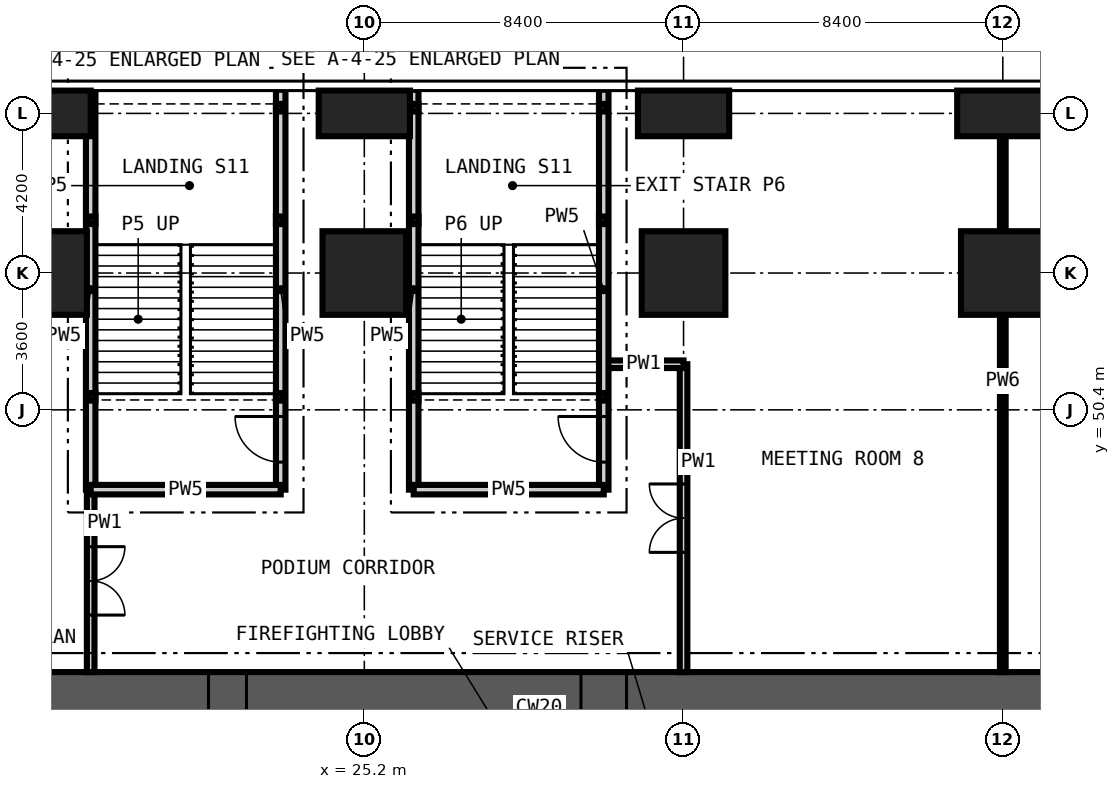
"""IFC4 building model, lengths in metres.
Left out: names, types, materials, properties, quantities, classifications, styles, units other than length and angle.
Written with IfcOpenShell. Run it as: python <this file> out.ifc"""

import sys

from ifc_helpers import new_model, si_unit, direction, frame, frame_2d, origin, origin_2d, place, context, subcontext, project, spatial, rectangle, hollow_rectangle, extrude, element, fill, save


model = new_model("IFC4")
c1 = context("Model", 3, precision=1e-05, world=origin(), true_north=direction((0.0, 1.0)))
c2 = subcontext(c1, "Body", "Model", "MODEL_VIEW")
j1 = project(units=[si_unit("LENGTHUNIT", "METRE"), si_unit("PLANEANGLEUNIT", "RADIAN")], contexts=[c1])
p1 = place(None, origin())
s1 = spatial("IfcSite", under=j1, at=p1, CompositionType="ELEMENT")
p2 = place(p1, origin())
s2 = spatial("IfcBuilding", under=s1, at=p2, CompositionType="ELEMENT")
p3 = place(p2, frame((0.0, 0.0, 12.0)))
s3 = spatial("IfcBuildingStorey", under=s2, at=p3, CompositionType="ELEMENT", Elevation=12.0)
p4 = place(p3, frame((16.8, 54.0, -0.3), z_axis=(0.0, 0.0, 1.0), x_axis=(1.0, 0.0, 0.0)))
e1 = element("IfcColumn", 1, at=p4, inside=s3, PredefinedType="COLUMN", context=c2, shape_type="SweptSolid", body=[
    extrude(rectangle(XDim=2.2, YDim=2.2, at=origin_2d()), origin(), (0.0, 0.0, 1.0), 5.0),
])
p5 = place(p3, frame((16.8, 58.2, -0.3), z_axis=(0.0, 0.0, 1.0), x_axis=(1.0, 0.0, 0.0)))
e2 = element("IfcColumn", 2, at=p5, inside=s3, PredefinedType="COLUMN", context=c2, shape_type="SweptSolid", body=[
    extrude(rectangle(XDim=2.4, YDim=1.2, at=origin_2d()), origin(), (0.0, 0.0, 1.0), 5.0),
])
p6 = place(p3, frame((25.2, 54.0, -0.3), z_axis=(0.0, 0.0, 1.0), x_axis=(1.0, 0.0, 0.0)))
e3 = element("IfcColumn", 3, at=p6, inside=s3, PredefinedType="COLUMN", context=c2, shape_type="SweptSolid", body=[
    extrude(rectangle(XDim=2.2, YDim=2.2, at=origin_2d()), origin(), (0.0, 0.0, 1.0), 5.0),
])
p7 = place(p3, frame((25.2, 58.2, -0.3), z_axis=(0.0, 0.0, 1.0), x_axis=(1.0, 0.0, 0.0)))
e4 = element("IfcColumn", 4, at=p7, inside=s3, PredefinedType="COLUMN", context=c2, shape_type="SweptSolid", body=[
    extrude(rectangle(XDim=2.4, YDim=1.2, at=origin_2d()), origin(), (0.0, 0.0, 1.0), 5.0),
])
p8 = place(p3, frame((33.6, 54.0, -0.3), z_axis=(0.0, 0.0, 1.0), x_axis=(1.0, 0.0, 0.0)))
e5 = element("IfcColumn", 5, at=p8, inside=s3, PredefinedType="COLUMN", context=c2, shape_type="SweptSolid", body=[
    extrude(rectangle(XDim=2.2, YDim=2.2, at=origin_2d()), origin(), (0.0, 0.0, 1.0), 5.0),
])
p9 = place(p3, frame((33.6, 58.2, -0.3), z_axis=(0.0, 0.0, 1.0), x_axis=(1.0, 0.0, 0.0)))
e6 = element("IfcColumn", 6, at=p9, inside=s3, PredefinedType="COLUMN", context=c2, shape_type="SweptSolid", body=[
    extrude(rectangle(XDim=2.4, YDim=1.2, at=origin_2d()), origin(), (0.0, 0.0, 1.0), 5.0),
])
p10 = place(p3, frame((42.0, 54.0, -0.3), z_axis=(0.0, 0.0, 1.0), x_axis=(1.0, 0.0, 0.0)))
e7 = element("IfcColumn", 7, at=p10, inside=s3, PredefinedType="COLUMN", context=c2, shape_type="SweptSolid", body=[
    extrude(rectangle(XDim=2.2, YDim=2.2, at=origin_2d()), origin(), (0.0, 0.0, 1.0), 5.0),
])
p11 = place(p3, frame((42.0, 58.2, -0.3), z_axis=(0.0, 0.0, 1.0), x_axis=(1.0, 0.0, 0.0)))
e8 = element("IfcColumn", 8, at=p11, inside=s3, PredefinedType="COLUMN", context=c2, shape_type="SweptSolid", body=[
    extrude(rectangle(XDim=2.4, YDim=1.2, at=origin_2d()), origin(), (0.0, 0.0, 1.0), 5.0),
])
p12 = place(p3, frame((43.5, 42.5, -0.3), z_axis=(0.0, 0.0, 1.0), x_axis=(-1.0, 0.0, 0.0)))
e9 = element("IfcWall", 9, at=p12, inside=s3, PredefinedType="SHEAR", context=c2, shape_type="SweptSolid", body=[
    extrude(rectangle(XDim=28.2, YDim=2.0, at=frame_2d((14.1, 0.0))), origin(), (0.0, 0.0, 1.0), 5.0),
])
p13 = place(p12, frame((21.4, 0.0, 0.3)))
e10 = element("IfcOpeningElement", 10, at=p13, cuts=e9, PredefinedType="OPENING", context=c2, shape_type="SweptSolid", body=[
    extrude(rectangle(XDim=1.0, YDim=2.1, at=frame_2d((0.5, 1.05))), frame((0.0, 1.01, 0.0), z_axis=(0.0, -1.0, 0.0), x_axis=(1.0, 0.0, 0.0)), (0.0, 0.0, 1.0), 2.02),
])
p14 = place(p12, frame((11.4, 0.0, 0.3)))
e11 = element("IfcOpeningElement", 11, at=p14, cuts=e9, PredefinedType="OPENING", context=c2, shape_type="SweptSolid", body=[
    extrude(rectangle(XDim=1.2, YDim=2.2, at=frame_2d((0.6, 1.1))), frame((0.0, 1.01, 0.0), z_axis=(0.0, -1.0, 0.0), x_axis=(1.0, 0.0, 0.0)), (0.0, 0.0, 1.0), 2.02),
])
p15 = place(p3, frame((33.6, 43.5, 0.0), z_axis=(0.0, 0.0, 1.0), x_axis=(0.0, 1.0, 0.0)))
e12 = element("IfcWall", 12, at=p15, inside=s3, PredefinedType="PARTITIONING", context=c2, shape_type="SweptSolid", body=[
    extrude(rectangle(XDim=8.1, YDim=0.2, at=frame_2d((4.05, 0.0))), origin(), (0.0, 0.0, 1.0), 4.7),
])
p16 = place(p15, frame((3.15, 0.0, 0.0)))
e13 = element("IfcOpeningElement", 13, at=p16, cuts=e12, PredefinedType="OPENING", context=c2, shape_type="SweptSolid", body=[
    extrude(rectangle(XDim=1.8, YDim=2.4, at=frame_2d((0.9, 1.2))), frame((0.0, 0.11, 0.0), z_axis=(0.0, -1.0, 0.0), x_axis=(1.0, 0.0, 0.0)), (0.0, 0.0, 1.0), 0.22),
])
p17 = place(p3, frame((18.0, 48.3, 0.0), z_axis=(0.0, 0.0, 1.0), x_axis=(0.0, -1.0, 0.0)))
e14 = element("IfcWall", 14, at=p17, inside=s3, PredefinedType="PARTITIONING", context=c2, shape_type="SweptSolid", body=[
    extrude(rectangle(XDim=4.8, YDim=0.2, at=frame_2d((2.4, 0.0))), origin(), (0.0, 0.0, 1.0), 4.7),
])
p18 = place(p17, frame((1.5, 0.0, 0.0)))
e15 = element("IfcOpeningElement", 15, at=p18, cuts=e14, PredefinedType="OPENING", context=c2, shape_type="SweptSolid", body=[
    extrude(rectangle(XDim=1.8, YDim=2.4, at=frame_2d((0.9, 1.2))), frame((0.0, 0.11, 0.0), z_axis=(0.0, -1.0, 0.0), x_axis=(1.0, 0.0, 0.0)), (0.0, 0.0, 1.0), 0.22),
])
p19 = place(p3, frame((33.6, 51.6, 0.0), z_axis=(0.0, 0.0, 1.0), x_axis=(-1.0, 0.0, 0.0)))
e16 = element("IfcWall", 16, at=p19, inside=s3, PredefinedType="PARTITIONING", context=c2, shape_type="SweptSolid", body=[
    extrude(rectangle(XDim=2.1, YDim=0.2, at=frame_2d((1.05, 0.0))), origin(), (0.0, 0.0, 1.0), 4.7),
])
p20 = place(p3, frame((42.0, 43.5, 0.0), z_axis=(0.0, 0.0, 1.0), x_axis=(0.0, 1.0, 0.0)))
e17 = element("IfcWall", 17, at=p20, inside=s3, PredefinedType="PARTITIONING", context=c2, shape_type="SweptSolid", body=[
    extrude(rectangle(XDim=15.3, YDim=0.15, at=frame_2d((7.65, 0.0))), origin(), (0.0, 0.0, 1.0), 4.7),
])
p21 = place(p3, frame((18.0, 48.3, 0.0), z_axis=(0.0, 0.0, 1.0), x_axis=(0.0, 1.0, 0.0)))
e18 = element("IfcWall", 18, at=p21, inside=s3, PredefinedType="PARTITIONING", context=c2, shape_type="SweptSolid", body=[
    extrude(rectangle(XDim=10.523, YDim=0.25, at=frame_2d((5.261, 0.0))), origin(), (0.0, 0.0, 1.0), 4.7),
])
p22 = place(p3, frame((23.0, 48.3, 0.0), z_axis=(0.0, 0.0, 1.0), x_axis=(0.0, 1.0, 0.0)))
e19 = element("IfcWall", 19, at=p22, inside=s3, PredefinedType="PARTITIONING", context=c2, shape_type="SweptSolid", body=[
    extrude(rectangle(XDim=10.523, YDim=0.25, at=frame_2d((5.261, 0.0))), origin(), (0.0, 0.0, 1.0), 4.7),
])
p23 = place(p22, frame((0.725, 0.0, 0.0)))
e20 = element("IfcOpeningElement", 20, at=p23, cuts=e19, PredefinedType="OPENING", context=c2, shape_type="SweptSolid", body=[
    extrude(rectangle(XDim=1.2, YDim=2.2, at=frame_2d((0.6, 1.1))), frame((0.0, 0.135, 0.0), z_axis=(0.0, -1.0, 0.0), x_axis=(1.0, 0.0, 0.0)), (0.0, 0.0, 1.0), 0.27),
])
p24 = place(p3, frame((26.5, 48.3, 0.0), z_axis=(0.0, 0.0, 1.0), x_axis=(0.0, 1.0, 0.0)))
e21 = element("IfcWall", 21, at=p24, inside=s3, PredefinedType="PARTITIONING", context=c2, shape_type="SweptSolid", body=[
    extrude(rectangle(XDim=10.523, YDim=0.25, at=frame_2d((5.261, 0.0))), origin(), (0.0, 0.0, 1.0), 4.7),
])
p25 = place(p3, frame((31.5, 48.3, 0.0), z_axis=(0.0, 0.0, 1.0), x_axis=(0.0, 1.0, 0.0)))
e22 = element("IfcWall", 22, at=p25, inside=s3, PredefinedType="PARTITIONING", context=c2, shape_type="SweptSolid", body=[
    extrude(rectangle(XDim=10.523, YDim=0.25, at=frame_2d((5.261, 0.0))), origin(), (0.0, 0.0, 1.0), 4.7),
])
p26 = place(p25, frame((0.725, 0.0, 0.0)))
e23 = element("IfcOpeningElement", 23, at=p26, cuts=e22, PredefinedType="OPENING", context=c2, shape_type="SweptSolid", body=[
    extrude(rectangle(XDim=1.2, YDim=2.2, at=frame_2d((0.6, 1.1))), frame((0.0, 0.135, 0.0), z_axis=(0.0, -1.0, 0.0), x_axis=(1.0, 0.0, 0.0)), (0.0, 0.0, 1.0), 0.27),
])
for number, where, z_axis, x_axis in (
    (24, (18.0, 48.3, 0.0), (0.0, 0.0, 1.0), (1.0, 0.0, 0.0)),
    (25, (26.5, 48.3, 0.0), (0.0, 0.0, 1.0), (1.0, 0.0, 0.0)),
):
    element("IfcWall", number, at=place(p3, frame(where, z_axis=z_axis, x_axis=x_axis)), inside=s3, PredefinedType="PARTITIONING", context=c2, shape_type="SweptSolid", body=[
        extrude(rectangle(XDim=5.0, YDim=0.25, at=frame_2d((2.5, 0.0))), origin(), (0.0, 0.0, 1.0), 4.7),
    ])
for number, where, z_axis, x_axis in (
    (26, (18.025, 50.742, -0.3), (0.0, 0.0, 1.0), (1.0, 0.0, 0.0)),
    (27, (22.975, 50.742, -0.3), (0.0, 0.0, 1.0), (1.0, 0.0, 0.0)),
    (28, (18.025, 55.387, -0.3), (0.0, 0.0, 1.0), (1.0, 0.0, 0.0)),
    (29, (22.975, 55.387, -0.3), (0.0, 0.0, 1.0), (1.0, 0.0, 0.0)),
    (30, (22.975, 58.35, -0.3), (0.0, 0.0, 1.0), (1.0, 0.0, 0.0)),
    (31, (26.525, 50.742, -0.3), (0.0, 0.0, 1.0), (1.0, 0.0, 0.0)),
    (32, (31.475, 50.742, -0.3), (0.0, 0.0, 1.0), (1.0, 0.0, 0.0)),
    (33, (26.525, 55.387, -0.3), (0.0, 0.0, 1.0), (1.0, 0.0, 0.0)),
    (34, (31.475, 55.387, -0.3), (0.0, 0.0, 1.0), (1.0, 0.0, 0.0)),
    (35, (26.525, 58.35, -0.3), (0.0, 0.0, 1.0), (1.0, 0.0, 0.0)),
    (36, (31.475, 58.35, -0.3), (0.0, 0.0, 1.0), (1.0, 0.0, 0.0)),
):
    element("IfcColumn", number, at=place(p3, frame(where, z_axis=z_axis, x_axis=x_axis)), inside=s3, PredefinedType="COLUMN", context=c2, shape_type="SweptSolid", body=[
        extrude(hollow_rectangle(XDim=0.2, YDim=0.2, WallThickness=0.01, at=origin_2d()), origin(), (0.0, 0.0, 1.0), 5.0),
    ])
p27 = place(p23, origin())
e37 = element("IfcDoor", 37, at=p27, inside=s3, OperationType="SINGLE_SWING_RIGHT", PredefinedType="DOOR", context=c2, shape_type="SweptSolid", body=[
    extrude(rectangle(XDim=1.2, YDim=2.2, at=frame_2d((0.6, 1.1))), frame((0.0, 0.025, 0.0), z_axis=(0.0, -1.0, 0.0), x_axis=(1.0, 0.0, 0.0)), (0.0, 0.0, 1.0), 0.05),
])
fill(e20, e37)
p28 = place(p26, origin())
e38 = element("IfcDoor", 38, at=p28, inside=s3, OperationType="SINGLE_SWING_RIGHT", PredefinedType="DOOR", context=c2, shape_type="SweptSolid", body=[
    extrude(rectangle(XDim=1.2, YDim=2.2, at=frame_2d((0.6, 1.1))), frame((0.0, 0.025, 0.0), z_axis=(0.0, -1.0, 0.0), x_axis=(1.0, 0.0, 0.0)), (0.0, 0.0, 1.0), 0.05),
])
fill(e23, e38)
p29 = place(p13, origin())
e39 = element("IfcDoor", 39, at=p29, inside=s3, OperationType="SINGLE_SWING_LEFT", PredefinedType="DOOR", context=c2, shape_type="SweptSolid", body=[
    extrude(rectangle(XDim=1.0, YDim=2.1, at=frame_2d((0.5, 1.05))), frame((0.0, 0.025, 0.0), z_axis=(0.0, -1.0, 0.0), x_axis=(1.0, 0.0, 0.0)), (0.0, 0.0, 1.0), 0.05),
])
fill(e10, e39)
p30 = place(p14, origin())
e40 = element("IfcDoor", 40, at=p30, inside=s3, OperationType="SINGLE_SWING_LEFT", PredefinedType="DOOR", context=c2, shape_type="SweptSolid", body=[
    extrude(rectangle(XDim=1.2, YDim=2.2, at=frame_2d((0.6, 1.1))), frame((0.0, 0.025, 0.0), z_axis=(0.0, -1.0, 0.0), x_axis=(1.0, 0.0, 0.0)), (0.0, 0.0, 1.0), 0.05),
])
fill(e11, e40)
p31 = place(p18, origin())
e41 = element("IfcDoor", 41, at=p31, inside=s3, OperationType="DOUBLE_DOOR_DOUBLE_SWING", PredefinedType="DOOR", context=c2, shape_type="SweptSolid", body=[
    extrude(rectangle(XDim=1.8, YDim=2.4, at=frame_2d((0.9, 1.2))), frame((0.0, 0.025, 0.0), z_axis=(0.0, -1.0, 0.0), x_axis=(1.0, 0.0, 0.0)), (0.0, 0.0, 1.0), 0.05),
])
fill(e15, e41)
p32 = place(p16, origin())
e42 = element("IfcDoor", 42, at=p32, inside=s3, OperationType="DOUBLE_DOOR_DOUBLE_SWING", PredefinedType="DOOR", context=c2, shape_type="SweptSolid", body=[
    extrude(rectangle(XDim=1.8, YDim=2.4, at=frame_2d((0.9, 1.2))), frame((0.0, 0.025, 0.0), z_axis=(0.0, -1.0, 0.0), x_axis=(1.0, 0.0, 0.0)), (0.0, 0.0, 1.0), 0.05),
])
fill(e13, e42)
save(model, sys.argv[1])
